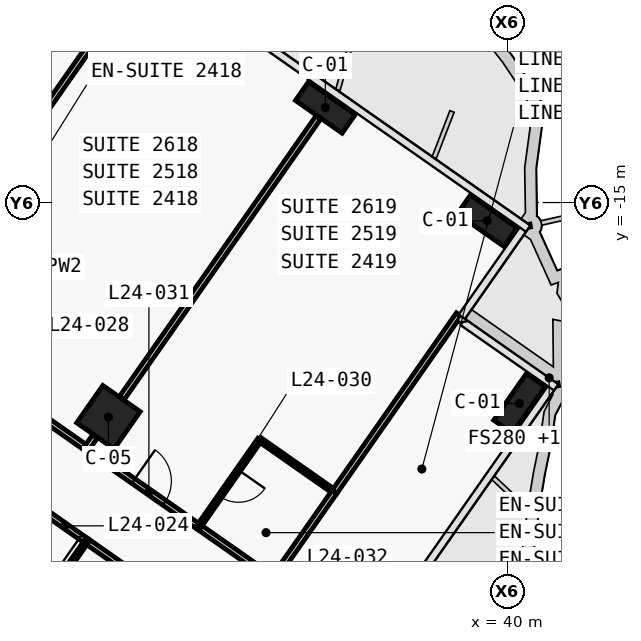
"""IFC4 building model, lengths in metres.
Left out: names, types, materials, properties, quantities, classifications, styles, units other than length and angle.
Written with IfcOpenShell. Run it as: python <this file> out.ifc"""

import sys

from ifc_helpers import new_model, si_unit, direction, frame, frame_2d, origin, origin_2d, place, context, subcontext, project, spatial, rectangle, extrude, element, fill, save


model = new_model("IFC4")
c1 = context("Model", 3, precision=1e-05, world=origin(), true_north=direction((0.0, 1.0)))
c2 = subcontext(c1, "Body", "Model", "MODEL_VIEW")
j1 = project(units=[si_unit("LENGTHUNIT", "METRE"), si_unit("PLANEANGLEUNIT", "RADIAN")], contexts=[c1])
p1 = place(None, origin())
s1 = spatial("IfcSite", under=j1, at=p1, CompositionType="ELEMENT")
p2 = place(p1, origin())
s2 = spatial("IfcBuilding", under=s1, at=p2, CompositionType="ELEMENT")
p3 = place(p2, frame((0.0, 0.0, 112.1)))
s3 = spatial("IfcBuildingStorey", under=s2, at=p3, CompositionType="ELEMENT", Elevation=112.1)
for number, where, z_axis, x_axis in (
    (1, (35.197, -12.498, 0.0), (0.0, 0.0, 1.0), (0.819, -0.574, 0.0)),
    (2, (39.456, -15.481, 0.0), (0.0, 0.0, 1.0), (0.819, -0.574, 0.0)),
    (3, (40.303, -20.286, 0.0), (0.0, 0.0, 1.0), (0.574, 0.819, 0.0)),
):
    element("IfcColumn", number, at=place(p3, frame(where, z_axis=z_axis, x_axis=x_axis)), inside=s3, PredefinedType="COLUMN", context=c2, shape_type="SweptSolid", body=[
        extrude(rectangle(XDim=1.5, YDim=0.6, at=origin_2d()), origin(), (0.0, 0.0, 1.0), 3.6),
    ])
p4 = place(p3, frame((29.49, -20.649, 0.0), z_axis=(0.0, 0.0, 1.0), x_axis=(0.819152044289, -0.573576436351, 0.0)))
e4 = element("IfcColumn", 4, at=p4, inside=s3, PredefinedType="COLUMN", context=c2, shape_type="SweptSolid", body=[
    extrude(rectangle(XDim=1.2, YDim=1.2, at=origin_2d()), origin(), (0.0, 0.0, 1.0), 3.6),
])
p5 = place(p3, frame((25.966, -19.403, 0.0), z_axis=(0.0, 0.0, 1.0), x_axis=(0.81917779803, -0.57353965444, 0.0)))
e5 = element("IfcWall", 5, at=p5, inside=s3, PredefinedType="PARTITIONING", context=c2, shape_type="SweptSolid", body=[
    extrude(rectangle(XDim=3.603, YDim=0.15, at=frame_2d((1.801, 0.0))), origin(), (0.0, 0.0, 1.0), 2.6),
])
p6 = place(p5, frame((1.101, 0.0, 0.0)))
e6 = element("IfcOpeningElement", 6, at=p6, cuts=e5, PredefinedType="OPENING", context=c2, shape_type="SweptSolid", body=[
    extrude(rectangle(XDim=1.0, YDim=2.1, at=frame_2d((0.5, 1.05))), frame((0.0, 0.085, 0.0), z_axis=(0.0, -1.0, 0.0), x_axis=(1.0, 0.0, 0.0)), (0.0, 0.0, 1.0), 0.17),
])
p7 = place(p3, frame((28.914, -21.467, 0.0), z_axis=(0.0, 0.0, 1.0), x_axis=(0.819145961204, -0.573585123798, 0.0)))
e7 = element("IfcWall", 7, at=p7, inside=s3, PredefinedType="PARTITIONING", context=c2, shape_type="SweptSolid", body=[
    extrude(rectangle(XDim=3.603, YDim=0.15, at=frame_2d((1.802, 0.0))), origin(), (0.0, 0.0, 1.0), 2.6),
])
p8 = place(p7, frame((1.502, 0.0, 0.0)))
e8 = element("IfcOpeningElement", 8, at=p8, cuts=e7, PredefinedType="OPENING", context=c2, shape_type="SweptSolid", body=[
    extrude(rectangle(XDim=1.0, YDim=2.1, at=frame_2d((0.5, 1.05))), frame((0.0, 0.085, 0.0), z_axis=(0.0, -1.0, 0.0), x_axis=(1.0, 0.0, 0.0)), (0.0, 0.0, 1.0), 0.17),
])
p9 = place(p3, frame((31.863, -23.531, 0.0), z_axis=(0.0, 0.0, 1.0), x_axis=(0.819146032251, -0.573585022335, 0.0)))
e9 = element("IfcWall", 9, at=p9, inside=s3, PredefinedType="PARTITIONING", context=c2, shape_type="SweptSolid", body=[
    extrude(rectangle(XDim=2.404, YDim=0.15, at=frame_2d((1.202, 0.0))), origin(), (0.0, 0.0, 1.0), 3.32),
])
p10 = place(p3, frame((28.917, -23.91, 0.0), z_axis=(0.0, 0.0, 1.0), x_axis=(-0.819117471667, 0.573625808005, 0.0)))
e10 = element("IfcWall", 10, at=p10, inside=s3, PredefinedType="PARTITIONING", context=c2, shape_type="SweptSolid", body=[
    extrude(rectangle(XDim=1.403, YDim=0.15, at=frame_2d((0.702, 0.0))), origin(), (0.0, 0.0, 1.0), 2.6),
])
p11 = place(p10, frame((0.201, 0.0, 0.0)))
e11 = element("IfcOpeningElement", 11, at=p11, cuts=e10, PredefinedType="OPENING", context=c2, shape_type="SweptSolid", body=[
    extrude(rectangle(XDim=1.0, YDim=2.1, at=frame_2d((0.5, 1.05))), frame((0.0, 0.085, 0.0), z_axis=(0.0, -1.0, 0.0), x_axis=(1.0, 0.0, 0.0)), (0.0, 0.0, 1.0), 0.17),
])
p12 = place(p3, frame((30.228, -24.828, 0.0), z_axis=(0.0, 0.0, 1.0), x_axis=(-0.819189013667, 0.573523634986, 0.0)))
e12 = element("IfcWall", 12, at=p12, inside=s3, PredefinedType="PARTITIONING", context=c2, shape_type="SweptSolid", body=[
    extrude(rectangle(XDim=1.604, YDim=0.15, at=frame_2d((0.802, 0.0))), origin(), (0.0, 0.0, 1.0), 3.32),
])
p13 = place(p3, frame((30.482, -8.77, 0.0), z_axis=(0.0, 0.0, 1.0), x_axis=(-0.573576058406, -0.819152308929, 0.0)))
e13 = element("IfcWall", 13, at=p13, inside=s3, PredefinedType="PARTITIONING", context=c2, shape_type="SweptSolid", body=[
    extrude(rectangle(XDim=8.501, YDim=0.15, at=frame_2d((4.25, 0.0))), origin(), (0.0, 0.0, 1.0), 2.6),
])
p14 = place(p3, frame((26.746, -12.014, 0.0), z_axis=(0.0, 0.0, 1.0), x_axis=(0.573560650686, 0.819163097304, 0.0)))
e14 = element("IfcWall", 14, at=p14, inside=s3, PredefinedType="PARTITIONING", context=c2, shape_type="SweptSolid", body=[
    extrude(rectangle(XDim=3.0, YDim=0.15, at=frame_2d((1.5, 0.0))), origin(), (0.0, 0.0, 1.0), 3.32),
])
p15 = place(p3, frame((35.013, -12.76, 0.0), z_axis=(0.0, 0.0, 1.0), x_axis=(-0.573558725113, -0.819164445546, 0.0)))
e15 = element("IfcWall", 15, at=p15, inside=s3, PredefinedType="PARTITIONING", context=c2, shape_type="SweptSolid", body=[
    extrude(rectangle(XDim=9.01, YDim=0.15, at=frame_2d((4.505, 0.0))), origin(), (0.0, 0.0, 1.0), 2.6),
])
p16 = place(p3, frame((29.134, -21.156, 0.0), z_axis=(0.0, 0.0, 1.0), x_axis=(-0.572944929411, -0.819593867633, 0.0)))
e16 = element("IfcWall", 16, at=p16, inside=s3, PredefinedType="PARTITIONING", context=c2, shape_type="SweptSolid", body=[
    extrude(rectangle(XDim=0.38, YDim=0.15, at=frame_2d((0.19, 0.0))), origin(), (0.0, 0.0, 1.0), 2.6),
])
p17 = place(p3, frame((35.438, -22.615, 0.0), z_axis=(0.0, 0.0, 1.0), x_axis=(-0.819141114317, 0.573592045652, 0.0)))
e17 = element("IfcWall", 17, at=p17, inside=s3, PredefinedType="PARTITIONING", context=c2, shape_type="SweptSolid", body=[
    extrude(rectangle(XDim=2.4, YDim=0.12, at=frame_2d((1.2, 0.0))), origin(), (0.0, 0.0, 1.0), 3.32),
])
p18 = place(p3, frame((33.47, -21.239, 0.0), z_axis=(0.0, 0.0, 1.0), x_axis=(-0.573550118428, -0.819170471667, 0.0)))
e18 = element("IfcWall", 18, at=p18, inside=s3, PredefinedType="PARTITIONING", context=c2, shape_type="SweptSolid", body=[
    extrude(rectangle(XDim=2.8, YDim=0.12, at=frame_2d((1.4, 0.0))), origin(), (0.0, 0.0, 1.0), 2.6),
])
p19 = place(p18, frame((0.975, 0.0, 0.0)))
e19 = element("IfcOpeningElement", 19, at=p19, cuts=e18, PredefinedType="OPENING", context=c2, shape_type="SweptSolid", body=[
    extrude(rectangle(XDim=0.85, YDim=2.05, at=frame_2d((0.425, 1.025))), frame((0.0, 0.07, 0.0), z_axis=(0.0, -1.0, 0.0), x_axis=(1.0, 0.0, 0.0)), (0.0, 0.0, 1.0), 0.14),
])
p20 = place(p3, frame((38.708, -17.945, 0.0), z_axis=(0.0, 0.0, 1.0), x_axis=(-0.573568678046, -0.819157476658, 0.0)))
e20 = element("IfcWall", 20, at=p20, inside=s3, PredefinedType="PARTITIONING", context=c2, shape_type="SweptSolid", body=[
    extrude(rectangle(XDim=5.701, YDim=0.15, at=frame_2d((2.851, 0.0))), origin(), (0.0, 0.0, 1.0), 3.32),
])
p21 = place(p3, frame((35.437, -22.616, 0.0), z_axis=(0.0, 0.0, 1.0), x_axis=(-0.573550118428, -0.819170471667, 0.0)))
e21 = element("IfcWall", 21, at=p21, inside=s3, PredefinedType="PARTITIONING", context=c2, shape_type="SweptSolid", body=[
    extrude(rectangle(XDim=2.8, YDim=0.15, at=frame_2d((1.4, 0.0))), origin(), (0.0, 0.0, 1.0), 2.6),
])
p22 = place(p3, frame((28.915, -23.909, 0.0), z_axis=(0.0, 0.0, 1.0), x_axis=(-0.573645091666, -0.819103967032, 0.0)))
e22 = element("IfcWall", 22, at=p22, inside=s3, PredefinedType="PARTITIONING", context=c2, shape_type="SweptSolid", body=[
    extrude(rectangle(XDim=2.6, YDim=0.12, at=frame_2d((1.3, 0.0))), origin(), (0.0, 0.0, 1.0), 3.32),
])
p23 = place(p22, frame((0.875, 0.0, 0.0)))
e23 = element("IfcOpeningElement", 23, at=p23, cuts=e22, PredefinedType="OPENING", context=c2, shape_type="SweptSolid", body=[
    extrude(rectangle(XDim=0.85, YDim=2.05, at=frame_2d((0.425, 1.025))), frame((0.0, 0.07, 0.0), z_axis=(0.0, -1.0, 0.0), x_axis=(1.0, 0.0, 0.0)), (0.0, 0.0, 1.0), 0.14),
])
p24 = place(p11, origin())
e24 = element("IfcDoor", 24, at=p24, inside=s3, OperationType="SINGLE_SWING_LEFT", PredefinedType="DOOR", context=c2, shape_type="SweptSolid", body=[
    extrude(rectangle(XDim=1.0, YDim=2.1, at=frame_2d((0.5, 1.05))), frame((0.0, 0.025, 0.0), z_axis=(0.0, -1.0, 0.0), x_axis=(1.0, 0.0, 0.0)), (0.0, 0.0, 1.0), 0.05),
])
fill(e11, e24)
p25 = place(p19, origin())
e25 = element("IfcDoor", 25, at=p25, inside=s3, OperationType="SINGLE_SWING_RIGHT", PredefinedType="DOOR", context=c2, shape_type="SweptSolid", body=[
    extrude(rectangle(XDim=0.85, YDim=2.05, at=frame_2d((0.425, 1.025))), frame((0.0, 0.025, 0.0), z_axis=(0.0, -1.0, 0.0), x_axis=(1.0, 0.0, 0.0)), (0.0, 0.0, 1.0), 0.05),
])
fill(e19, e25)
p26 = place(p8, origin())
e26 = element("IfcDoor", 26, at=p26, inside=s3, OperationType="SINGLE_SWING_LEFT", PredefinedType="DOOR", context=c2, shape_type="SweptSolid", body=[
    extrude(rectangle(XDim=1.0, YDim=2.1, at=frame_2d((0.5, 1.05))), frame((0.0, 0.025, 0.0), z_axis=(0.0, -1.0, 0.0), x_axis=(1.0, 0.0, 0.0)), (0.0, 0.0, 1.0), 0.05),
])
fill(e8, e26)
save(model, sys.argv[1])
